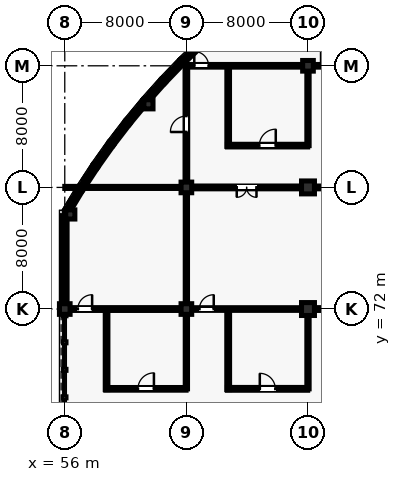
"""IFC4 building model, lengths in metres.
Left out: names, types, materials, properties, quantities, classifications, styles, units other than length and angle.
Written with IfcOpenShell. Run it as: python <this file> out.ifc"""

import sys

from ifc_helpers import new_model, si_unit, direction, frame, frame_2d, origin, origin_2d, place, context, subcontext, project, spatial, rectangle, extrude, element, fill, save


model = new_model("IFC4")
c1 = context("Model", 3, precision=1e-05, world=origin(), true_north=direction((0.0, 1.0)))
c2 = subcontext(c1, "Body", "Model", "MODEL_VIEW")
j1 = project(units=[si_unit("LENGTHUNIT", "METRE"), si_unit("PLANEANGLEUNIT", "RADIAN")], contexts=[c1])
p1 = place(None, origin())
s1 = spatial("IfcSite", under=j1, at=p1, CompositionType="ELEMENT")
p2 = place(p1, origin())
s2 = spatial("IfcBuilding", under=s1, at=p2, CompositionType="ELEMENT")
p3 = place(p2, origin())
s3 = spatial("IfcBuildingStorey", under=s2, at=p3, CompositionType="ELEMENT", Elevation=0.0)
for number, where, z_axis, x_axis in (
    (1, (56.0, 72.0, 0.0), (0.0, 0.0, 1.0), (1.0, 0.0, 0.0)),
    (2, (64.0, 72.0, 0.0), (0.0, 0.0, 1.0), (1.0, 0.0, 0.0)),
    (3, (64.0, 80.0, 0.0), (0.0, 0.0, 1.0), (1.0, 0.0, 0.0)),
):
    element("IfcColumn", number, at=place(p3, frame(where, z_axis=z_axis, x_axis=x_axis)), inside=s3, PredefinedType="COLUMN", context=c2, shape_type="SweptSolid", body=[
        extrude(rectangle(XDim=0.7, YDim=0.7, at=origin_2d()), origin(), (0.0, 0.0, 1.0), 5.28),
    ])
for number, where, z_axis, x_axis in (
    (4, (72.0, 72.0, 0.0), (0.0, 0.0, 1.0), (1.0, 0.0, 0.0)),
    (5, (72.0, 80.0, 0.0), (0.0, 0.0, 1.0), (1.0, 0.0, 0.0)),
):
    element("IfcColumn", number, at=place(p3, frame(where, z_axis=z_axis, x_axis=x_axis)), inside=s3, PredefinedType="COLUMN", context=c2, shape_type="SweptSolid", body=[
        extrude(rectangle(XDim=0.85, YDim=0.85, at=origin_2d()), origin(), (0.0, 0.0, 1.0), 5.28),
    ])
p4 = place(p3, frame((72.0, 88.0, 0.0), z_axis=(0.0, 0.0, 1.0), x_axis=(1.0, 0.0, 0.0)))
e6 = element("IfcColumn", 6, at=p4, inside=s3, PredefinedType="COLUMN", context=c2, shape_type="SweptSolid", body=[
    extrude(rectangle(XDim=0.7, YDim=0.7, at=origin_2d()), origin(), (0.0, 0.0, 1.0), 5.28),
])
for number, where, z_axis, x_axis in (
    (7, (61.505, 85.467, 0.0), (0.0, 0.0, 1.0), (1.0, 0.0, 0.0)),
    (8, (56.364, 78.221, 0.0), (0.0, 0.0, 1.0), (1.0, 0.0, 0.0)),
):
    element("IfcColumn", number, at=place(p3, frame(where, z_axis=z_axis, x_axis=x_axis)), inside=s3, PredefinedType="COLUMN", context=c2, shape_type="SweptSolid", body=[
        extrude(rectangle(XDim=0.6, YDim=0.6, at=origin_2d()), origin(), (0.0, 0.0, 1.0), 5.28),
    ])
p5 = place(p3, frame((65.029, 89.506, 0.0), z_axis=(0.0, 0.0, 1.0), x_axis=(-0.720242191926, -0.693722700342, 0.0)))
e9 = element("IfcWall", 9, at=p5, inside=s3, PredefinedType="SOLIDWALL", context=c2, shape_type="SweptSolid", body=[
    extrude(rectangle(XDim=1.795, YDim=0.305, at=frame_2d((0.897, 0.0))), origin(), (0.0, 0.0, 1.0), 5.035),
])
p6 = place(p5, frame((0.347, 0.0, 0.9)))
e10 = element("IfcOpeningElement", 10, at=p6, cuts=e9, PredefinedType="OPENING", context=c2, shape_type="SweptSolid", body=[
    extrude(rectangle(XDim=1.1, YDim=2.1, at=frame_2d((0.55, 1.05))), frame((0.0, 0.162, 0.0), z_axis=(0.0, -1.0, 0.0), x_axis=(1.0, 0.0, 0.0)), (0.0, 0.0, 1.0), 0.325),
])
p7 = place(p3, frame((63.74, 88.264, 0.0), z_axis=(0.0, 0.0, 1.0), x_axis=(-0.693722700342, -0.720242191926, 0.0)))
e11 = element("IfcWall", 11, at=p7, inside=s3, PredefinedType="SOLIDWALL", context=c2, shape_type="SweptSolid", body=[
    extrude(rectangle(XDim=1.795, YDim=0.305, at=frame_2d((0.897, 0.0))), origin(), (0.0, 0.0, 1.0), 5.035),
])
p8 = place(p7, frame((0.347, 0.0, 0.9)))
e12 = element("IfcOpeningElement", 12, at=p8, cuts=e11, PredefinedType="OPENING", context=c2, shape_type="SweptSolid", body=[
    extrude(rectangle(XDim=1.1, YDim=2.1, at=frame_2d((0.55, 1.05))), frame((0.0, 0.162, 0.0), z_axis=(0.0, -1.0, 0.0), x_axis=(1.0, 0.0, 0.0)), (0.0, 0.0, 1.0), 0.325),
])
p9 = place(p3, frame((62.498, 86.976, 0.0), z_axis=(0.0, 0.0, 1.0), x_axis=(-0.666277888361, -0.745703543965, 0.0)))
e13 = element("IfcWall", 13, at=p9, inside=s3, PredefinedType="SOLIDWALL", context=c2, shape_type="SweptSolid", body=[
    extrude(rectangle(XDim=1.795, YDim=0.305, at=frame_2d((0.897, 0.0))), origin(), (0.0, 0.0, 1.0), 5.035),
])
p10 = place(p3, frame((61.306, 85.642, 0.0), z_axis=(0.0, 0.0, 1.0), x_axis=(-0.638054732073, -0.769991012207, 0.0)))
e14 = element("IfcWall", 14, at=p10, inside=s3, PredefinedType="SOLIDWALL", context=c2, shape_type="SweptSolid", body=[
    extrude(rectangle(XDim=1.795, YDim=0.305, at=frame_2d((0.897, 0.0))), origin(), (0.0, 0.0, 1.0), 5.035),
])
p11 = place(p3, frame((60.164, 84.264, 0.0), z_axis=(0.0, 0.0, 1.0), x_axis=(-0.608776981616, -0.793341406114, 0.0)))
e15 = element("IfcWall", 15, at=p11, inside=s3, PredefinedType="SOLIDWALL", context=c2, shape_type="SweptSolid", body=[
    extrude(rectangle(XDim=1.795, YDim=0.305, at=frame_2d((0.897, 0.0))), origin(), (0.0, 0.0, 1.0), 5.035),
])
p12 = place(p11, frame((0.347, 0.0, 0.9)))
e16 = element("IfcOpeningElement", 16, at=p12, cuts=e15, PredefinedType="OPENING", context=c2, shape_type="SweptSolid", body=[
    extrude(rectangle(XDim=1.1, YDim=2.1, at=frame_2d((0.55, 1.05))), frame((0.0, 0.162, 0.0), z_axis=(0.0, -1.0, 0.0), x_axis=(1.0, 0.0, 0.0)), (0.0, 0.0, 1.0), 0.325),
])
p13 = place(p3, frame((59.075, 82.844, 0.0), z_axis=(0.0, 0.0, 1.0), x_axis=(-0.578662393636, -0.815567185578, 0.0)))
e17 = element("IfcWall", 17, at=p13, inside=s3, PredefinedType="SOLIDWALL", context=c2, shape_type="SweptSolid", body=[
    extrude(rectangle(XDim=1.795, YDim=0.305, at=frame_2d((0.897, 0.0))), origin(), (0.0, 0.0, 1.0), 5.035),
])
p14 = place(p13, frame((0.348, 0.0, 0.9)))
e18 = element("IfcOpeningElement", 18, at=p14, cuts=e17, PredefinedType="OPENING", context=c2, shape_type="SweptSolid", body=[
    extrude(rectangle(XDim=1.1, YDim=2.1, at=frame_2d((0.55, 1.05))), frame((0.0, 0.162, 0.0), z_axis=(0.0, -1.0, 0.0), x_axis=(1.0, 0.0, 0.0)), (0.0, 0.0, 1.0), 0.325),
])
p15 = place(p3, frame((58.039, 81.385, 0.0), z_axis=(0.0, 0.0, 1.0), x_axis=(-0.547681678944, -0.836686786408, 0.0)))
e19 = element("IfcWall", 19, at=p15, inside=s3, PredefinedType="SOLIDWALL", context=c2, shape_type="SweptSolid", body=[
    extrude(rectangle(XDim=1.795, YDim=0.305, at=frame_2d((0.897, 0.0))), origin(), (0.0, 0.0, 1.0), 5.035),
])
p16 = place(p15, frame((0.347, 0.0, 0.9)))
e20 = element("IfcOpeningElement", 20, at=p16, cuts=e19, PredefinedType="OPENING", context=c2, shape_type="SweptSolid", body=[
    extrude(rectangle(XDim=1.1, YDim=2.1, at=frame_2d((0.55, 1.05))), frame((0.0, 0.162, 0.0), z_axis=(0.0, -1.0, 0.0), x_axis=(1.0, 0.0, 0.0)), (0.0, 0.0, 1.0), 0.325),
])
p17 = place(p3, frame((57.059, 79.888, 0.0), z_axis=(0.0, 0.0, 1.0), x_axis=(-0.51607516088, -0.856543302071, 0.0)))
e21 = element("IfcWall", 21, at=p17, inside=s3, PredefinedType="SOLIDWALL", context=c2, shape_type="SweptSolid", body=[
    extrude(rectangle(XDim=1.795, YDim=0.305, at=frame_2d((0.897, 0.0))), origin(), (0.0, 0.0, 1.0), 5.035),
])
p18 = place(p3, frame((56.0, 72.335, 0.0), z_axis=(0.0, 0.0, 1.0), x_axis=(0.0, 1.0, 0.0)))
e22 = element("IfcWall", 22, at=p18, inside=s3, PredefinedType="SOLIDWALL", context=c2, shape_type="SweptSolid", body=[
    extrude(rectangle(XDim=5.811, YDim=0.305, at=frame_2d((2.905, 0.0))), origin(), (0.0, 0.0, 1.0), 5.035),
])
p19 = place(p18, frame((1.705, 0.0, 0.9)))
e23 = element("IfcOpeningElement", 23, at=p19, cuts=e22, PredefinedType="OPENING", context=c2, shape_type="SweptSolid", body=[
    extrude(rectangle(XDim=2.4, YDim=2.8, at=frame_2d((1.2, 1.4))), frame((0.0, 0.162, 0.0), z_axis=(0.0, -1.0, 0.0), x_axis=(1.0, 0.0, 0.0)), (0.0, 0.0, 1.0), 0.325),
])
p20 = place(p3, frame((58.7, 66.75, 0.0), z_axis=(0.0, 0.0, 1.0), x_axis=(1.0, 0.0, 0.0)))
e24 = element("IfcWall", 24, at=p20, inside=s3, PredefinedType="PARTITIONING", context=c2, shape_type="SweptSolid", body=[
    extrude(rectangle(XDim=5.28, YDim=0.175, at=frame_2d((2.64, 0.0))), origin(), (0.0, 0.0, 1.0), 4.403),
])
p21 = place(p20, frame((2.115, 0.0, 0.0)))
e25 = element("IfcOpeningElement", 25, at=p21, cuts=e24, PredefinedType="OPENING", context=c2, shape_type="SweptSolid", body=[
    extrude(rectangle(XDim=1.05, YDim=2.15, at=frame_2d((0.525, 1.075))), frame((0.0, 0.097, 0.0), z_axis=(0.0, -1.0, 0.0), x_axis=(1.0, 0.0, 0.0)), (0.0, 0.0, 1.0), 0.195),
])
p22 = place(p3, frame((58.75, 66.7, 0.0), z_axis=(0.0, 0.0, 1.0), x_axis=(0.0, 1.0, 0.0)))
e26 = element("IfcWall", 26, at=p22, inside=s3, PredefinedType="PARTITIONING", context=c2, shape_type="SweptSolid", body=[
    extrude(rectangle(XDim=5.28, YDim=0.175, at=frame_2d((2.64, 0.0))), origin(), (0.0, 0.0, 1.0), 4.327),
])
p23 = place(p3, frame((64.0, 66.75, 0.0), z_axis=(0.0, 0.0, 1.0), x_axis=(0.0, 1.0, 0.0)))
e27 = element("IfcWall", 27, at=p23, inside=s3, PredefinedType="PARTITIONING", context=c2, shape_type="SweptSolid", body=[
    extrude(rectangle(XDim=4.89, YDim=0.15, at=frame_2d((2.445, 0.0))), origin(), (0.0, 0.0, 1.0), 4.403),
])
p24 = place(p3, frame((66.7, 66.75, 0.0), z_axis=(0.0, 0.0, 1.0), x_axis=(1.0, 0.0, 0.0)))
e28 = element("IfcWall", 28, at=p24, inside=s3, PredefinedType="PARTITIONING", context=c2, shape_type="SweptSolid", body=[
    extrude(rectangle(XDim=5.28, YDim=0.185, at=frame_2d((2.64, 0.0))), origin(), (0.0, 0.0, 1.0), 4.412),
])
p25 = place(p24, frame((2.13, 0.0, 0.0)))
e29 = element("IfcOpeningElement", 29, at=p25, cuts=e28, PredefinedType="OPENING", context=c2, shape_type="SweptSolid", body=[
    extrude(rectangle(XDim=1.02, YDim=2.2, at=frame_2d((0.51, 1.1))), frame((0.0, 0.103, 0.0), z_axis=(0.0, -1.0, 0.0), x_axis=(1.0, 0.0, 0.0)), (0.0, 0.0, 1.0), 0.205),
])
p26 = place(p3, frame((66.75, 66.7, 0.0), z_axis=(0.0, 0.0, 1.0), x_axis=(0.0, 1.0, 0.0)))
e30 = element("IfcWall", 30, at=p26, inside=s3, PredefinedType="PARTITIONING", context=c2, shape_type="SweptSolid", body=[
    extrude(rectangle(XDim=5.28, YDim=0.185, at=frame_2d((2.64, 0.0))), origin(), (0.0, 0.0, 1.0), 4.403),
])
p27 = place(p3, frame((72.0, 66.75, 0.0), z_axis=(0.0, 0.0, 1.0), x_axis=(0.0, 1.0, 0.0)))
e31 = element("IfcWall", 31, at=p27, inside=s3, PredefinedType="PARTITIONING", context=c2, shape_type="SweptSolid", body=[
    extrude(rectangle(XDim=4.815, YDim=0.15, at=frame_2d((2.407, 0.0))), origin(), (0.0, 0.0, 1.0), 4.412),
])
p28 = place(p3, frame((66.7, 82.75, 0.0), z_axis=(0.0, 0.0, 1.0), x_axis=(1.0, 0.0, 0.0)))
e32 = element("IfcWall", 32, at=p28, inside=s3, PredefinedType="PARTITIONING", context=c2, shape_type="SweptSolid", body=[
    extrude(rectangle(XDim=5.28, YDim=0.175, at=frame_2d((2.64, 0.0))), origin(), (0.0, 0.0, 1.0), 4.471),
])
p29 = place(p28, frame((2.1, 0.0, 0.0)))
e33 = element("IfcOpeningElement", 33, at=p29, cuts=e32, PredefinedType="OPENING", context=c2, shape_type="SweptSolid", body=[
    extrude(rectangle(XDim=1.08, YDim=2.2, at=frame_2d((0.54, 1.1))), frame((0.0, 0.097, 0.0), z_axis=(0.0, -1.0, 0.0), x_axis=(1.0, 0.0, 0.0)), (0.0, 0.0, 1.0), 0.195),
])
p30 = place(p3, frame((66.75, 82.7, 0.0), z_axis=(0.0, 0.0, 1.0), x_axis=(0.0, 1.0, 0.0)))
e34 = element("IfcWall", 34, at=p30, inside=s3, PredefinedType="PARTITIONING", context=c2, shape_type="SweptSolid", body=[
    extrude(rectangle(XDim=5.28, YDim=0.175, at=frame_2d((2.64, 0.0))), origin(), (0.0, 0.0, 1.0), 5.025),
])
p31 = place(p3, frame((72.0, 82.75, 0.0), z_axis=(0.0, 0.0, 1.0), x_axis=(0.0, 1.0, 0.0)))
e35 = element("IfcWall", 35, at=p31, inside=s3, PredefinedType="PARTITIONING", context=c2, shape_type="SweptSolid", body=[
    extrude(rectangle(XDim=4.89, YDim=0.15, at=frame_2d((2.445, 0.0))), origin(), (0.0, 0.0, 1.0), 4.471),
])
p32 = place(p3, frame((56.34, 72.0, 0.0), z_axis=(0.0, 0.0, 1.0), x_axis=(1.0, 0.0, 0.0)))
e36 = element("IfcWall", 36, at=p32, inside=s3, PredefinedType="PARTITIONING", context=c2, shape_type="SweptSolid", body=[
    extrude(rectangle(XDim=7.32, YDim=0.185, at=frame_2d((3.66, 0.0))), origin(), (0.0, 0.0, 1.0), 4.327),
])
p33 = place(p32, frame((0.52, 0.0, 0.0)))
e37 = element("IfcOpeningElement", 37, at=p33, cuts=e36, PredefinedType="OPENING", context=c2, shape_type="SweptSolid", body=[
    extrude(rectangle(XDim=0.94, YDim=2.12, at=frame_2d((0.47, 1.06))), frame((0.0, 0.103, 0.0), z_axis=(0.0, -1.0, 0.0), x_axis=(1.0, 0.0, 0.0)), (0.0, 0.0, 1.0), 0.205),
])
p34 = place(p3, frame((64.0, 72.34, 0.0), z_axis=(0.0, 0.0, 1.0), x_axis=(0.0, 1.0, 0.0)))
e38 = element("IfcWall", 38, at=p34, inside=s3, PredefinedType="PARTITIONING", context=c2, shape_type="SweptSolid", body=[
    extrude(rectangle(XDim=7.32, YDim=0.15, at=frame_2d((3.66, 0.0))), origin(), (0.0, 0.0, 1.0), 4.412),
])
p35 = place(p3, frame((56.0, 80.0, 0.0), z_axis=(0.0, 0.0, 1.0), x_axis=(1.0, 0.0, 0.0)))
e39 = element("IfcWall", 39, at=p35, inside=s3, PredefinedType="PARTITIONING", context=c2, shape_type="SweptSolid", body=[
    extrude(rectangle(XDim=7.66, YDim=0.135, at=frame_2d((3.83, 0.0))), origin(), (0.0, 0.0, 1.0), 5.025),
])
p36 = place(p3, frame((64.0, 80.34, 0.0), z_axis=(0.0, 0.0, 1.0), x_axis=(0.0, 1.0, 0.0)))
e40 = element("IfcWall", 40, at=p36, inside=s3, PredefinedType="PARTITIONING", context=c2, shape_type="SweptSolid", body=[
    extrude(rectangle(XDim=7.66, YDim=0.175, at=frame_2d((3.83, 0.0))), origin(), (0.0, 0.0, 1.0), 5.025),
])
p37 = place(p36, frame((3.305, 0.0, 0.0)))
e41 = element("IfcOpeningElement", 41, at=p37, cuts=e40, PredefinedType="OPENING", context=c2, shape_type="SweptSolid", body=[
    extrude(rectangle(XDim=1.05, YDim=2.15, at=frame_2d((0.525, 1.075))), frame((0.0, 0.097, 0.0), z_axis=(0.0, -1.0, 0.0), x_axis=(1.0, 0.0, 0.0)), (0.0, 0.0, 1.0), 0.195),
])
p38 = place(p3, frame((64.34, 72.0, 0.0), z_axis=(0.0, 0.0, 1.0), x_axis=(1.0, 0.0, 0.0)))
e42 = element("IfcWall", 42, at=p38, inside=s3, PredefinedType="PARTITIONING", context=c2, shape_type="SweptSolid", body=[
    extrude(rectangle(XDim=7.245, YDim=0.175, at=frame_2d((3.623, 0.0))), origin(), (0.0, 0.0, 1.0), 4.403),
])
p39 = place(p38, frame((0.52, 0.0, 0.0)))
e43 = element("IfcOpeningElement", 43, at=p39, cuts=e42, PredefinedType="OPENING", context=c2, shape_type="SweptSolid", body=[
    extrude(rectangle(XDim=0.94, YDim=2.12, at=frame_2d((0.47, 1.06))), frame((0.0, 0.097, 0.0), z_axis=(0.0, -1.0, 0.0), x_axis=(1.0, 0.0, 0.0)), (0.0, 0.0, 1.0), 0.195),
])
p40 = place(p3, frame((64.34, 80.0, 0.0), z_axis=(0.0, 0.0, 1.0), x_axis=(1.0, 0.0, 0.0)))
e44 = element("IfcWall", 44, at=p40, inside=s3, PredefinedType="PARTITIONING", context=c2, shape_type="SweptSolid", body=[
    extrude(rectangle(XDim=7.245, YDim=0.185, at=frame_2d((3.623, 0.0))), origin(), (0.0, 0.0, 1.0), 4.336),
])
p41 = place(p40, frame((2.972, 0.0, 0.0)))
e45 = element("IfcOpeningElement", 45, at=p41, cuts=e44, PredefinedType="OPENING", context=c2, shape_type="SweptSolid", body=[
    extrude(rectangle(XDim=1.3, YDim=2.2, at=frame_2d((0.65, 1.1))), frame((0.0, 0.103, 0.0), z_axis=(0.0, -1.0, 0.0), x_axis=(1.0, 0.0, 0.0)), (0.0, 0.0, 1.0), 0.205),
])
p42 = place(p3, frame((64.0, 88.0, 0.0), z_axis=(0.0, 0.0, 1.0), x_axis=(1.0, 0.0, 0.0)))
e46 = element("IfcWall", 46, at=p42, inside=s3, PredefinedType="PARTITIONING", context=c2, shape_type="SweptSolid", body=[
    extrude(rectangle(XDim=7.66, YDim=0.175, at=frame_2d((3.83, 0.0))), origin(), (0.0, 0.0, 1.0), 5.025),
])
p43 = place(p42, frame((0.52, 0.0, 0.0)))
e47 = element("IfcOpeningElement", 47, at=p43, cuts=e46, PredefinedType="OPENING", context=c2, shape_type="SweptSolid", body=[
    extrude(rectangle(XDim=0.94, YDim=2.12, at=frame_2d((0.47, 1.06))), frame((0.0, 0.097, 0.0), z_axis=(0.0, -1.0, 0.0), x_axis=(1.0, 0.0, 0.0)), (0.0, 0.0, 1.0), 0.195),
])
p44 = place(p3, frame((72.415, 72.0, 0.0), z_axis=(0.0, 0.0, 1.0), x_axis=(1.0, 0.0, 0.0)))
e48 = element("IfcWall", 48, at=p44, inside=s3, PredefinedType="PARTITIONING", context=c2, shape_type="SweptSolid", body=[
    extrude(rectangle(XDim=7.396, YDim=0.185, at=frame_2d((3.698, 0.0))), origin(), (0.0, 0.0, 1.0), 4.336),
])
p45 = place(p44, frame((0.52, 0.0, 0.0)))
e49 = element("IfcOpeningElement", 49, at=p45, cuts=e48, PredefinedType="OPENING", context=c2, shape_type="SweptSolid", body=[
    extrude(rectangle(XDim=0.94, YDim=2.12, at=frame_2d((0.47, 1.06))), frame((0.0, 0.103, 0.0), z_axis=(0.0, -1.0, 0.0), x_axis=(1.0, 0.0, 0.0)), (0.0, 0.0, 1.0), 0.205),
])
p46 = place(p3, frame((72.415, 80.0, 0.0), z_axis=(0.0, 0.0, 1.0), x_axis=(1.0, 0.0, 0.0)))
e50 = element("IfcWall", 50, at=p46, inside=s3, PredefinedType="PARTITIONING", context=c2, shape_type="SweptSolid", body=[
    extrude(rectangle(XDim=7.396, YDim=0.185, at=frame_2d((3.698, 0.0))), origin(), (0.0, 0.0, 1.0), 4.404),
])
p47 = place(p46, frame((3.048, 0.0, 0.0)))
e51 = element("IfcOpeningElement", 51, at=p47, cuts=e50, PredefinedType="OPENING", context=c2, shape_type="SweptSolid", body=[
    extrude(rectangle(XDim=1.3, YDim=2.2, at=frame_2d((0.65, 1.1))), frame((0.0, 0.103, 0.0), z_axis=(0.0, -1.0, 0.0), x_axis=(1.0, 0.0, 0.0)), (0.0, 0.0, 1.0), 0.205),
])
p48 = place(p3, frame((72.34, 88.0, 0.0), z_axis=(0.0, 0.0, 1.0), x_axis=(1.0, 0.0, 0.0)))
e52 = element("IfcWall", 52, at=p48, inside=s3, PredefinedType="PARTITIONING", context=c2, shape_type="SweptSolid", body=[
    extrude(rectangle(XDim=7.32, YDim=0.175, at=frame_2d((3.66, 0.0))), origin(), (0.0, 0.0, 1.0), 4.327),
])
p49 = place(p48, frame((0.52, 0.0, 0.0)))
e53 = element("IfcOpeningElement", 53, at=p49, cuts=e52, PredefinedType="OPENING", context=c2, shape_type="SweptSolid", body=[
    extrude(rectangle(XDim=0.94, YDim=2.12, at=frame_2d((0.47, 1.06))), frame((0.0, 0.097, 0.0), z_axis=(0.0, -1.0, 0.0), x_axis=(1.0, 0.0, 0.0)), (0.0, 0.0, 1.0), 0.195),
])
p50 = place(p6, origin())
e54 = element("IfcWindow", 54, at=p50, inside=s3, PartitioningType="SINGLE_PANEL", PredefinedType="WINDOW", context=c2, shape_type="SweptSolid", body=[
    extrude(rectangle(XDim=1.1, YDim=2.1, at=frame_2d((0.55, 1.05))), frame((0.0, 0.03, 0.0), z_axis=(0.0, -1.0, 0.0), x_axis=(1.0, 0.0, 0.0)), (0.0, 0.0, 1.0), 0.06),
])
fill(e10, e54)
p51 = place(p8, origin())
e55 = element("IfcWindow", 55, at=p51, inside=s3, PartitioningType="SINGLE_PANEL", PredefinedType="WINDOW", context=c2, shape_type="SweptSolid", body=[
    extrude(rectangle(XDim=1.1, YDim=2.1, at=frame_2d((0.55, 1.05))), frame((0.0, 0.03, 0.0), z_axis=(0.0, -1.0, 0.0), x_axis=(1.0, 0.0, 0.0)), (0.0, 0.0, 1.0), 0.06),
])
fill(e12, e55)
p52 = place(p12, origin())
e56 = element("IfcWindow", 56, at=p52, inside=s3, PartitioningType="SINGLE_PANEL", PredefinedType="WINDOW", context=c2, shape_type="SweptSolid", body=[
    extrude(rectangle(XDim=1.1, YDim=2.1, at=frame_2d((0.55, 1.05))), frame((0.0, 0.03, 0.0), z_axis=(0.0, -1.0, 0.0), x_axis=(1.0, 0.0, 0.0)), (0.0, 0.0, 1.0), 0.06),
])
fill(e16, e56)
p53 = place(p14, origin())
e57 = element("IfcWindow", 57, at=p53, inside=s3, PartitioningType="SINGLE_PANEL", PredefinedType="WINDOW", context=c2, shape_type="SweptSolid", body=[
    extrude(rectangle(XDim=1.1, YDim=2.1, at=frame_2d((0.55, 1.05))), frame((0.0, 0.03, 0.0), z_axis=(0.0, -1.0, 0.0), x_axis=(1.0, 0.0, 0.0)), (0.0, 0.0, 1.0), 0.06),
])
fill(e18, e57)
p54 = place(p16, origin())
e58 = element("IfcWindow", 58, at=p54, inside=s3, PartitioningType="SINGLE_PANEL", PredefinedType="WINDOW", context=c2, shape_type="SweptSolid", body=[
    extrude(rectangle(XDim=1.1, YDim=2.1, at=frame_2d((0.55, 1.05))), frame((0.0, 0.03, 0.0), z_axis=(0.0, -1.0, 0.0), x_axis=(1.0, 0.0, 0.0)), (0.0, 0.0, 1.0), 0.06),
])
fill(e20, e58)
p55 = place(p19, origin())
e59 = element("IfcWindow", 59, at=p55, inside=s3, PartitioningType="SINGLE_PANEL", PredefinedType="WINDOW", context=c2, shape_type="SweptSolid", body=[
    extrude(rectangle(XDim=2.4, YDim=2.8, at=frame_2d((1.2, 1.4))), frame((0.0, 0.03, 0.0), z_axis=(0.0, -1.0, 0.0), x_axis=(1.0, 0.0, 0.0)), (0.0, 0.0, 1.0), 0.06),
])
fill(e23, e59)
p56 = place(p21, origin())
e60 = element("IfcDoor", 60, at=p56, inside=s3, OperationType="SINGLE_SWING_RIGHT", PredefinedType="DOOR", context=c2, shape_type="SweptSolid", body=[
    extrude(rectangle(XDim=1.05, YDim=2.15, at=frame_2d((0.525, 1.075))), frame((0.0, 0.025, 0.0), z_axis=(0.0, -1.0, 0.0), x_axis=(1.0, 0.0, 0.0)), (0.0, 0.0, 1.0), 0.05),
])
fill(e25, e60)
p57 = place(p25, origin())
e61 = element("IfcDoor", 61, at=p57, inside=s3, OperationType="SINGLE_SWING_LEFT", PredefinedType="DOOR", context=c2, shape_type="SweptSolid", body=[
    extrude(rectangle(XDim=1.02, YDim=2.2, at=frame_2d((0.51, 1.1))), frame((0.0, 0.025, 0.0), z_axis=(0.0, -1.0, 0.0), x_axis=(1.0, 0.0, 0.0)), (0.0, 0.0, 1.0), 0.05),
])
fill(e29, e61)
p58 = place(p29, origin())
e62 = element("IfcDoor", 62, at=p58, inside=s3, OperationType="SINGLE_SWING_RIGHT", PredefinedType="DOOR", context=c2, shape_type="SweptSolid", body=[
    extrude(rectangle(XDim=1.08, YDim=2.2, at=frame_2d((0.54, 1.1))), frame((0.0, 0.025, 0.0), z_axis=(0.0, -1.0, 0.0), x_axis=(1.0, 0.0, 0.0)), (0.0, 0.0, 1.0), 0.05),
])
fill(e33, e62)
p59 = place(p33, origin())
e63 = element("IfcDoor", 63, at=p59, inside=s3, OperationType="SINGLE_SWING_RIGHT", PredefinedType="DOOR", context=c2, shape_type="SweptSolid", body=[
    extrude(rectangle(XDim=0.94, YDim=2.12, at=frame_2d((0.47, 1.06))), frame((0.0, 0.025, 0.0), z_axis=(0.0, -1.0, 0.0), x_axis=(1.0, 0.0, 0.0)), (0.0, 0.0, 1.0), 0.05),
])
fill(e37, e63)
p60 = place(p37, origin())
e64 = element("IfcDoor", 64, at=p60, inside=s3, OperationType="SINGLE_SWING_LEFT", PredefinedType="DOOR", context=c2, shape_type="SweptSolid", body=[
    extrude(rectangle(XDim=1.05, YDim=2.15, at=frame_2d((0.525, 1.075))), frame((0.0, 0.025, 0.0), z_axis=(0.0, -1.0, 0.0), x_axis=(1.0, 0.0, 0.0)), (0.0, 0.0, 1.0), 0.05),
])
fill(e41, e64)
p61 = place(p39, origin())
e65 = element("IfcDoor", 65, at=p61, inside=s3, OperationType="SINGLE_SWING_RIGHT", PredefinedType="DOOR", context=c2, shape_type="SweptSolid", body=[
    extrude(rectangle(XDim=0.94, YDim=2.12, at=frame_2d((0.47, 1.06))), frame((0.0, 0.025, 0.0), z_axis=(0.0, -1.0, 0.0), x_axis=(1.0, 0.0, 0.0)), (0.0, 0.0, 1.0), 0.05),
])
fill(e43, e65)
p62 = place(p41, frame((1.3, 0.0, 0.0), z_axis=(0.0, 0.0, 1.0), x_axis=(-1.0, 0.0, 0.0)))
e66 = element("IfcDoor", 66, at=p62, inside=s3, OperationType="DOUBLE_DOOR_SINGLE_SWING", PredefinedType="DOOR", context=c2, shape_type="SweptSolid", body=[
    extrude(rectangle(XDim=1.3, YDim=2.2, at=frame_2d((0.65, 1.1))), frame((0.0, 0.025, 0.0), z_axis=(0.0, -1.0, 0.0), x_axis=(1.0, 0.0, 0.0)), (0.0, 0.0, 1.0), 0.05),
])
fill(e45, e66)
p63 = place(p43, origin())
e67 = element("IfcDoor", 67, at=p63, inside=s3, OperationType="SINGLE_SWING_LEFT", PredefinedType="DOOR", context=c2, shape_type="SweptSolid", body=[
    extrude(rectangle(XDim=0.94, YDim=2.12, at=frame_2d((0.47, 1.06))), frame((0.0, 0.025, 0.0), z_axis=(0.0, -1.0, 0.0), x_axis=(1.0, 0.0, 0.0)), (0.0, 0.0, 1.0), 0.05),
])
fill(e47, e67)
p64 = place(p49, origin())
e68 = element("IfcDoor", 68, at=p64, inside=s3, OperationType="SINGLE_SWING_LEFT", PredefinedType="DOOR", context=c2, shape_type="SweptSolid", body=[
    extrude(rectangle(XDim=0.94, YDim=2.12, at=frame_2d((0.47, 1.06))), frame((0.0, 0.025, 0.0), z_axis=(0.0, -1.0, 0.0), x_axis=(1.0, 0.0, 0.0)), (0.0, 0.0, 1.0), 0.05),
])
fill(e53, e68)
save(model, sys.argv[1])
